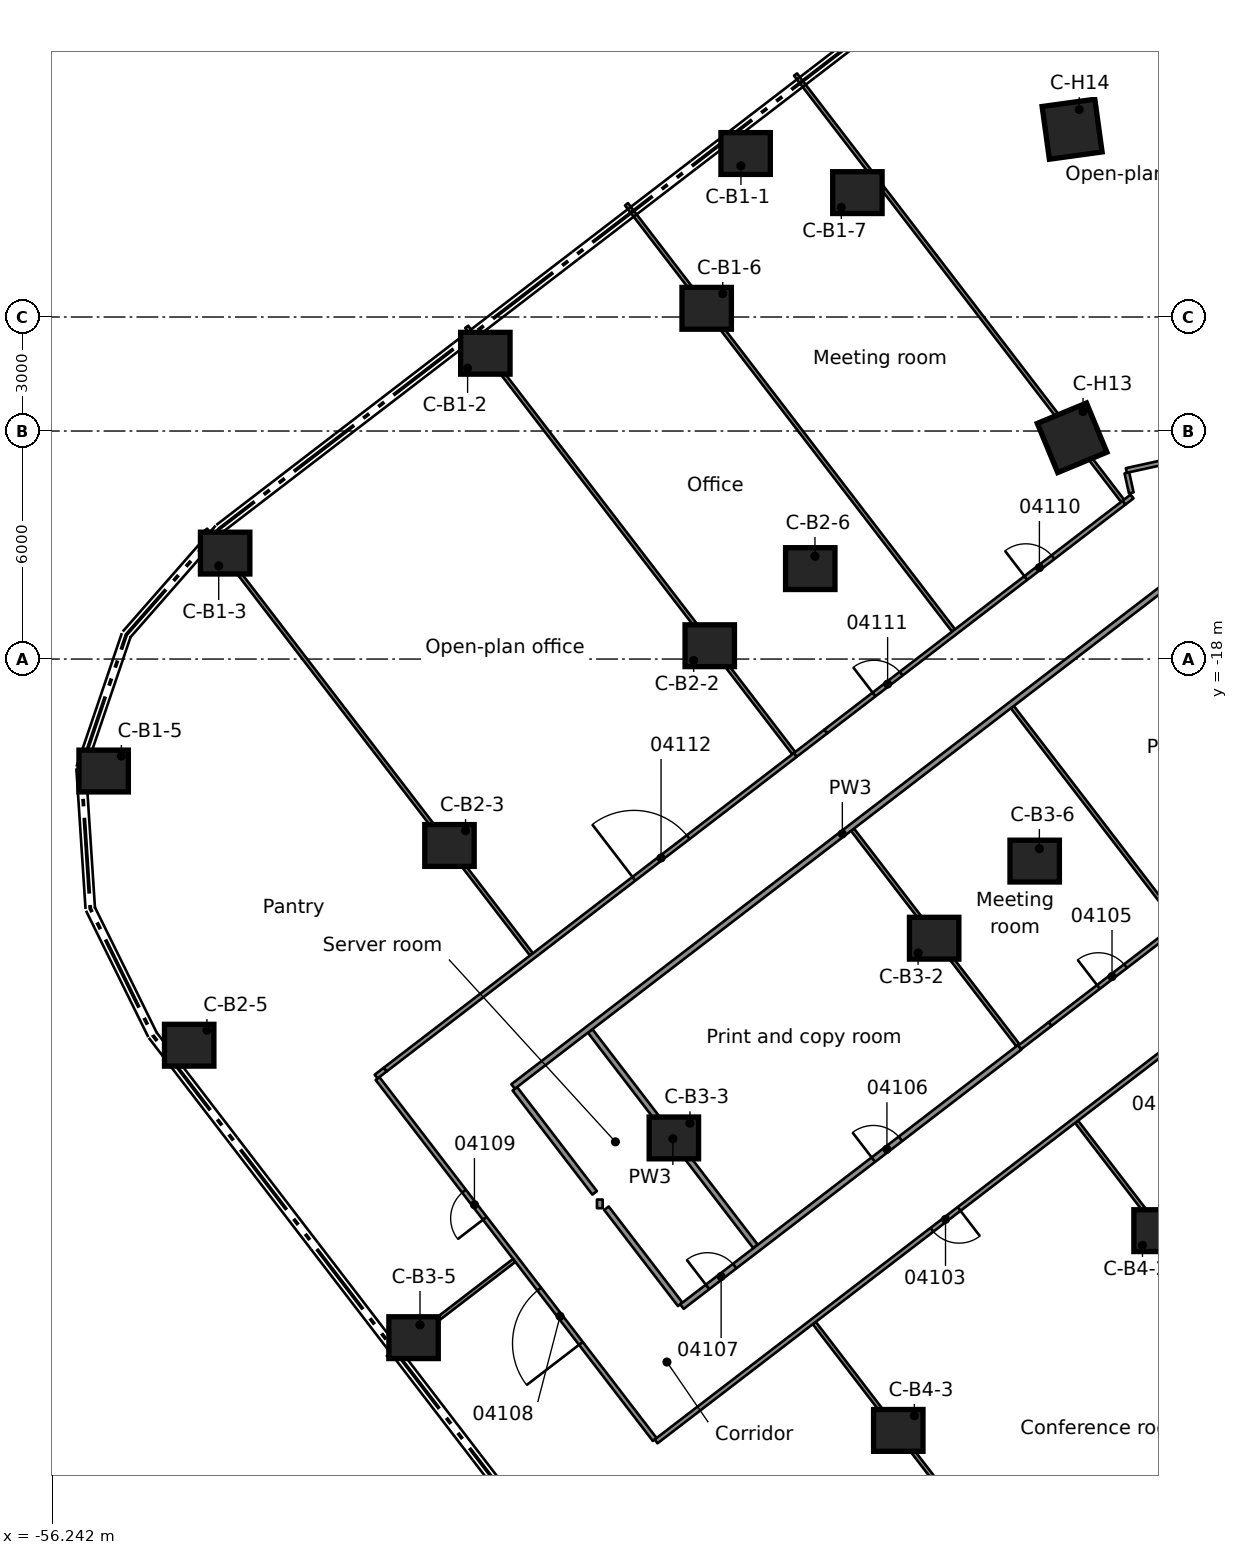
"""IFC4 building model, lengths in metres.
Left out: names, types, materials, properties, quantities, classifications, styles, units other than length and angle.
Written with IfcOpenShell. Run it as: python <this file> out.ifc"""

import sys

from ifc_helpers import new_model, si_unit, direction, frame, frame_2d, origin, origin_2d, place, context, subcontext, project, spatial, rectangle, extrude, element, fill, save


model = new_model("IFC4")
c1 = context("Model", 3, precision=1e-05, world=origin(), true_north=direction((0.0, 1.0)))
c2 = subcontext(c1, "Body", "Model", "MODEL_VIEW")
j1 = project(units=[si_unit("LENGTHUNIT", "METRE"), si_unit("PLANEANGLEUNIT", "RADIAN")], contexts=[c1])
p1 = place(None, origin())
s1 = spatial("IfcSite", under=j1, at=p1, CompositionType="ELEMENT")
p2 = place(p1, origin())
s2 = spatial("IfcBuilding", under=s1, at=p2, CompositionType="ELEMENT")
p3 = place(p2, frame((0.0, 0.0, 20.5)))
s3 = spatial("IfcBuildingStorey", under=s2, at=p3, CompositionType="ELEMENT", Elevation=20.5)
for number, where, z_axis, x_axis in (
    (1, (-37.991, -4.698, 0.0), (0.0, 0.0, 1.0), (1.0, 0.0, 0.0)),
    (2, (-44.84, -9.954, 0.0), (0.0, 0.0, 1.0), (1.0, 0.0, 0.0)),
    (3, (-51.687, -15.212, 0.0), (0.0, 0.0, 1.0), (1.0, 0.0, 0.0)),
    (4, (-54.884, -20.946, 0.0), (0.0, 0.0, 1.0), (1.0, 0.0, 0.0)),
    (5, (-39.016, -8.771, 0.0), (0.0, 0.0, 1.0), (1.0, 0.0, 0.0)),
    (6, (-35.05, -5.727, 0.0), (0.0, 0.0, 1.0), (1.0, 0.0, 0.0)),
    (7, (-38.935, -17.649, 0.0), (0.0, 0.0, 1.0), (1.0, 0.0, 0.0)),
    (8, (-45.784, -22.905, 0.0), (0.0, 0.0, 1.0), (1.0, 0.0, 0.0)),
    (9, (-52.633, -28.161, 0.0), (0.0, 0.0, 1.0), (1.0, 0.0, 0.0)),
    (10, (-36.29, -15.62, 0.0), (0.0, 0.0, 1.0), (1.0, 0.0, 0.0)),
    (11, (-33.03, -25.345, 0.0), (0.0, 0.0, 1.0), (1.0, 0.0, 0.0)),
    (12, (-39.879, -30.6, 0.0), (0.0, 0.0, 1.0), (1.0, 0.0, 0.0)),
    (13, (-46.729, -35.856, 0.0), (0.0, 0.0, 1.0), (1.0, 0.0, 0.0)),
    (14, (-30.385, -23.316, 0.0), (0.0, 0.0, 1.0), (1.0, 0.0, 0.0)),
    (15, (-27.125, -33.04, 0.0), (0.0, 0.0, 1.0), (1.0, 0.0, 0.0)),
    (16, (-33.974, -38.296, 0.0), (0.0, 0.0, 1.0), (1.0, 0.0, 0.0)),
):
    element("IfcColumn", number, at=place(p3, frame(where, z_axis=z_axis, x_axis=x_axis)), inside=s3, PredefinedType="COLUMN", context=c2, shape_type="SweptSolid", body=[
        extrude(rectangle(XDim=1.3, YDim=1.1, at=origin_2d()), origin(), (0.0, 0.0, 1.0), 4.6),
    ])
for number, where, z_axis, x_axis in (
    (17, (-29.4, -12.178, 0.0), (0.0, 0.0, 1.0), (-0.924, -0.383, 0.0)),
    (18, (-29.4, -4.059, 0.0), (0.0, 0.0, 1.0), (-0.991, -0.137, 0.0)),
):
    element("IfcColumn", number, at=place(p3, frame(where, z_axis=z_axis, x_axis=x_axis)), inside=s3, PredefinedType="COLUMN", context=c2, shape_type="SweptSolid", body=[
        extrude(rectangle(XDim=1.4, YDim=1.4, at=origin_2d()), origin(), (0.0, 0.0, 1.0), 4.6),
    ])
p4 = place(p3, frame((-27.959, -13.1, 0.0), z_axis=(0.0, 0.0, 1.0), x_axis=(0.215346078447, -0.976537795734, 0.0)))
e19 = element("IfcWall", 19, at=p4, inside=s3, PredefinedType="PARTITIONING", context=c2, shape_type="SweptSolid", body=[
    extrude(rectangle(XDim=0.539, YDim=0.125, at=frame_2d((0.269, 0.0))), origin(), (0.0, 0.0, 1.0), 4.16),
])
p5 = place(p3, frame((-40.384, -38.535, 0.0), z_axis=(0.0, 0.0, 1.0), x_axis=(-0.609026744184, 0.793149686294, 0.0)))
e20 = element("IfcWall", 20, at=p5, inside=s3, PredefinedType="PARTITIONING", context=c2, shape_type="SweptSolid", body=[
    extrude(rectangle(XDim=11.975, YDim=0.125, at=frame_2d((5.987, 0.0))), origin(), (0.0, 0.0, 1.0), 4.16),
])
p6 = place(p5, frame((3.188, 0.0, 0.0)))
e21 = element("IfcOpeningElement", 21, at=p6, cuts=e20, PredefinedType="OPENING", context=c2, shape_type="SweptSolid", body=[
    extrude(rectangle(XDim=1.8, YDim=2.1, at=frame_2d((0.9, 1.05))), frame((0.0, 0.073, 0.0), z_axis=(0.0, -1.0, 0.0), x_axis=(1.0, 0.0, 0.0)), (0.0, 0.0, 1.0), 0.145),
])
p7 = place(p5, frame((7.338, 0.0, 0.0)))
e22 = element("IfcOpeningElement", 22, at=p7, cuts=e20, PredefinedType="OPENING", context=c2, shape_type="SweptSolid", body=[
    extrude(rectangle(XDim=0.9, YDim=2.1, at=frame_2d((0.45, 1.05))), frame((0.0, 0.073, 0.0), z_axis=(0.0, -1.0, 0.0), x_axis=(1.0, 0.0, 0.0)), (0.0, 0.0, 1.0), 0.145),
])
p8 = place(p3, frame((-44.064, -29.307, 0.0), z_axis=(0.0, 0.0, 1.0), x_axis=(0.608421148176, -0.793614331053, 0.0)))
e23 = element("IfcWall", 23, at=p8, inside=s3, PredefinedType="PARTITIONING", context=c2, shape_type="SweptSolid", body=[
    extrude(rectangle(XDim=3.451, YDim=0.15, at=frame_2d((1.726, 0.0))), origin(), (0.0, 0.0, 1.0), 4.16),
])
p9 = place(p3, frame((-41.653, -32.45, 0.0), z_axis=(0.0, 0.0, 1.0), x_axis=(0.60867753108, -0.793417710389, 0.0)))
e24 = element("IfcWall", 24, at=p9, inside=s3, PredefinedType="PARTITIONING", context=c2, shape_type="SweptSolid", body=[
    extrude(rectangle(XDim=3.188, YDim=0.15, at=frame_2d((1.594, 0.0))), origin(), (0.0, 0.0, 1.0), 4.16),
])
p10 = place(p3, frame((-52.2, -14.599, 0.0), z_axis=(0.0, 0.0, 1.0), x_axis=(0.608818023879, -0.793309910312, 0.0)))
e25 = element("IfcWall", 25, at=p10, inside=s3, PredefinedType="PARTITIONING", context=c2, shape_type="SweptSolid", body=[
    extrude(rectangle(XDim=14.081, YDim=0.1, at=frame_2d((7.041, 0.0))), origin(), (0.0, 0.0, 1.0), 4.16),
])
p11 = place(p3, frame((-42.081, -27.786, 0.0), z_axis=(0.0, 0.0, 1.0), x_axis=(0.608779288924, -0.793339635577, 0.0)))
e26 = element("IfcWall", 26, at=p11, inside=s3, PredefinedType="PARTITIONING", context=c2, shape_type="SweptSolid", body=[
    extrude(rectangle(XDim=7.147, YDim=0.15, at=frame_2d((3.574, 0.0))), origin(), (0.0, 0.0, 1.0), 4.16),
])
p12 = place(p3, frame((-36.184, -35.471, 0.0), z_axis=(0.0, 0.0, 1.0), x_axis=(0.608732507749, -0.793375531517, 0.0)))
e27 = element("IfcWall", 27, at=p12, inside=s3, PredefinedType="PARTITIONING", context=c2, shape_type="SweptSolid", body=[
    extrude(rectangle(XDim=14.082, YDim=0.1, at=frame_2d((7.041, 0.0))), origin(), (0.0, 0.0, 1.0), 4.16),
])
p13 = place(p3, frame((-45.331, -9.259, 0.0), z_axis=(0.0, 0.0, 1.0), x_axis=(0.608775561638, -0.793342495743, 0.0)))
e28 = element("IfcWall", 28, at=p13, inside=s3, PredefinedType="PARTITIONING", context=c2, shape_type="SweptSolid", body=[
    extrude(rectangle(XDim=14.136, YDim=0.1, at=frame_2d((7.068, 0.0))), origin(), (0.0, 0.0, 1.0), 4.16),
])
p14 = place(p3, frame((-35.179, -22.489, 0.0), z_axis=(0.0, 0.0, 1.0), x_axis=(0.608729798771, -0.793377610024, 0.0)))
e29 = element("IfcWall", 29, at=p14, inside=s3, PredefinedType="PARTITIONING", context=c2, shape_type="SweptSolid", body=[
    extrude(rectangle(XDim=7.148, YDim=0.1, at=frame_2d((3.574, 0.0))), origin(), (0.0, 0.0, 1.0), 4.16),
])
p15 = place(p3, frame((-29.282, -30.175, 0.0), z_axis=(0.0, 0.0, 1.0), x_axis=(0.608783902678, -0.793336095132, 0.0)))
e30 = element("IfcWall", 30, at=p15, inside=s3, PredefinedType="PARTITIONING", context=c2, shape_type="SweptSolid", body=[
    extrude(rectangle(XDim=14.136, YDim=0.1, at=frame_2d((7.068, 0.0))), origin(), (0.0, 0.0, 1.0), 4.16),
])
p16 = place(p3, frame((-41.126, -6.033, 0.0), z_axis=(0.0, 0.0, 1.0), x_axis=(0.608775561638, -0.793342495743, 0.0)))
e31 = element("IfcWall", 31, at=p16, inside=s3, PredefinedType="PARTITIONING", context=c2, shape_type="SweptSolid", body=[
    extrude(rectangle(XDim=14.136, YDim=0.1, at=frame_2d((7.068, 0.0))), origin(), (0.0, 0.0, 1.0), 4.16),
])
p17 = place(p3, frame((-30.975, -19.261, 0.0), z_axis=(0.0, 0.0, 1.0), x_axis=(0.60876639971, -0.793349526113, 0.0)))
e32 = element("IfcWall", 32, at=p17, inside=s3, PredefinedType="PARTITIONING", context=c2, shape_type="SweptSolid", body=[
    extrude(rectangle(XDim=7.162, YDim=0.1, at=frame_2d((3.581, 0.0))), origin(), (0.0, 0.0, 1.0), 4.16),
])
p18 = place(p3, frame((-36.678, -2.62, 0.0), z_axis=(0.0, 0.0, 1.0), x_axis=(0.608783902678, -0.793336095132, 0.0)))
e33 = element("IfcWall", 33, at=p18, inside=s3, PredefinedType="PARTITIONING", context=c2, shape_type="SweptSolid", body=[
    extrude(rectangle(XDim=14.136, YDim=0.1, at=frame_2d((7.068, 0.0))), origin(), (0.0, 0.0, 1.0), 4.16),
])
p19 = place(p3, frame((-21.526, -11.624, 0.0), z_axis=(0.0, 0.0, 1.0), x_axis=(-0.976773623356, -0.214273863821, 0.0)))
e34 = element("IfcWall", 34, at=p19, inside=s3, PredefinedType="PARTITIONING", context=c2, shape_type="SweptSolid", body=[
    extrude(rectangle(XDim=6.599, YDim=0.125, at=frame_2d((3.3, 0.0))), origin(), (0.0, 0.0, 1.0), 4.16),
])
p20 = place(p3, frame((-20.592, -23.431, 0.0), z_axis=(0.0, 0.0, 1.0), x_axis=(-0.793434310261, -0.608655892356, 0.0)))
e35 = element("IfcWall", 35, at=p20, inside=s3, PredefinedType="PARTITIONING", context=c2, shape_type="SweptSolid", body=[
    extrude(rectangle(XDim=24.899, YDim=0.125, at=frame_2d((12.45, 0.0))), origin(), (0.0, 0.0, 1.0), 4.16),
])
p21 = place(p20, frame((2.443, 0.0, 0.0)))
e36 = element("IfcOpeningElement", 36, at=p21, cuts=e35, PredefinedType="OPENING", context=c2, shape_type="SweptSolid", body=[
    extrude(rectangle(XDim=0.9, YDim=2.1, at=frame_2d((0.45, 1.05))), frame((0.0, 0.073, 0.0), z_axis=(0.0, -1.0, 0.0), x_axis=(1.0, 0.0, 0.0)), (0.0, 0.0, 1.0), 0.145),
])
p22 = place(p20, frame((7.299, 0.0, 0.0)))
e37 = element("IfcOpeningElement", 37, at=p22, cuts=e35, PredefinedType="OPENING", context=c2, shape_type="SweptSolid", body=[
    extrude(rectangle(XDim=0.9, YDim=2.1, at=frame_2d((0.45, 1.05))), frame((0.0, 0.073, 0.0), z_axis=(0.0, -1.0, 0.0), x_axis=(1.0, 0.0, 0.0)), (0.0, 0.0, 1.0), 0.145),
])
p23 = place(p20, frame((14.849, 0.0, 0.0)))
e38 = element("IfcOpeningElement", 38, at=p23, cuts=e35, PredefinedType="OPENING", context=c2, shape_type="SweptSolid", body=[
    extrude(rectangle(XDim=0.9, YDim=2.1, at=frame_2d((0.45, 1.05))), frame((0.0, 0.073, 0.0), z_axis=(0.0, -1.0, 0.0), x_axis=(1.0, 0.0, 0.0)), (0.0, 0.0, 1.0), 0.145),
])
p24 = place(p3, frame((-30.782, -28.22, 0.0), z_axis=(0.0, 0.0, 1.0), x_axis=(0.793579274907, 0.608466872096, 0.0)))
e39 = element("IfcWall", 39, at=p24, inside=s3, PredefinedType="PARTITIONING", context=c2, shape_type="SweptSolid", body=[
    extrude(rectangle(XDim=1.016, YDim=0.125, at=frame_2d((0.508, 0.0))), origin(), (0.0, 0.0, 1.0), 4.16),
])
p25 = place(p3, frame((-39.667, -35.038, 0.0), z_axis=(0.0, 0.0, 1.0), x_axis=(0.793293656215, 0.608839202917, 0.0)))
e40 = element("IfcWall", 40, at=p25, inside=s3, PredefinedType="PARTITIONING", context=c2, shape_type="SweptSolid", body=[
    extrude(rectangle(XDim=11.2, YDim=0.15, at=frame_2d((5.6, 0.0))), origin(), (0.0, 0.0, 1.0), 4.16),
])
p26 = place(p25, frame((6.35, 0.0, 0.0)))
e41 = element("IfcOpeningElement", 41, at=p26, cuts=e40, PredefinedType="OPENING", context=c2, shape_type="SweptSolid", body=[
    extrude(rectangle(XDim=0.9, YDim=2.1, at=frame_2d((0.45, 1.05))), frame((0.0, 0.085, 0.0), z_axis=(0.0, -1.0, 0.0), x_axis=(1.0, 0.0, 0.0)), (0.0, 0.0, 1.0), 0.17),
])
p27 = place(p25, frame((0.85, 0.0, 0.0)))
e42 = element("IfcOpeningElement", 42, at=p27, cuts=e40, PredefinedType="OPENING", context=c2, shape_type="SweptSolid", body=[
    extrude(rectangle(XDim=0.9, YDim=2.1, at=frame_2d((0.45, 1.05))), frame((0.0, 0.085, 0.0), z_axis=(0.0, -1.0, 0.0), x_axis=(1.0, 0.0, 0.0)), (0.0, 0.0, 1.0), 0.17),
])
p28 = place(p3, frame((-29.976, -27.602, 0.0), z_axis=(0.0, 0.0, 1.0), x_axis=(0.793237948633, 0.608911780843, 0.0)))
e43 = element("IfcWall", 43, at=p28, inside=s3, PredefinedType="PARTITIONING", context=c2, shape_type="SweptSolid", body=[
    extrude(rectangle(XDim=9.336, YDim=0.125, at=frame_2d((4.668, 0.0))), origin(), (0.0, 0.0, 1.0), 4.16),
])
p29 = place(p28, frame((6.385, 0.0, 0.0)))
e44 = element("IfcOpeningElement", 44, at=p29, cuts=e43, PredefinedType="OPENING", context=c2, shape_type="SweptSolid", body=[
    extrude(rectangle(XDim=0.9, YDim=2.1, at=frame_2d((0.45, 1.05))), frame((0.0, 0.073, 0.0), z_axis=(0.0, -1.0, 0.0), x_axis=(1.0, 0.0, 0.0)), (0.0, 0.0, 1.0), 0.145),
])
p30 = place(p28, frame((1.6, 0.0, 0.0)))
e45 = element("IfcOpeningElement", 45, at=p30, cuts=e43, PredefinedType="OPENING", context=c2, shape_type="SweptSolid", body=[
    extrude(rectangle(XDim=0.9, YDim=2.1, at=frame_2d((0.45, 1.05))), frame((0.0, 0.073, 0.0), z_axis=(0.0, -1.0, 0.0), x_axis=(1.0, 0.0, 0.0)), (0.0, 0.0, 1.0), 0.145),
])
p31 = place(p3, frame((-47.403, -36.374, 0.0), z_axis=(0.0, 0.0, 1.0), x_axis=(0.793154740431, 0.609020162008, 0.0)))
e46 = element("IfcWall", 46, at=p31, inside=s3, PredefinedType="PARTITIONING", context=c2, shape_type="SweptSolid", body=[
    extrude(rectangle(XDim=4.187, YDim=0.1, at=frame_2d((2.094, 0.0))), origin(), (0.0, 0.0, 1.0), 4.16),
])
p32 = place(p3, frame((-44.11, -29.247, 0.0), z_axis=(0.0, 0.0, 1.0), x_axis=(0.793471030698, 0.608608021179, 0.0)))
e47 = element("IfcWall", 47, at=p32, inside=s3, PredefinedType="PARTITIONING", context=c2, shape_type="SweptSolid", body=[
    extrude(rectangle(XDim=21.838, YDim=0.15, at=frame_2d((10.919, 0.0))), origin(), (0.0, 0.0, 1.0), 4.16),
])
p33 = place(p3, frame((-36.687, -20.524, 0.0), z_axis=(0.0, 0.0, 1.0), x_axis=(0.793579274907, 0.608466872096, 0.0)))
e48 = element("IfcWall", 48, at=p33, inside=s3, PredefinedType="PARTITIONING", context=c2, shape_type="SweptSolid", body=[
    extrude(rectangle(XDim=1.016, YDim=0.125, at=frame_2d((0.508, 0.0))), origin(), (0.0, 0.0, 1.0), 4.16),
])
p34 = place(p3, frame((-47.476, -28.803, 0.0), z_axis=(0.0, 0.0, 1.0), x_axis=(0.793403481743, 0.608696077823, 0.0)))
e49 = element("IfcWall", 49, at=p34, inside=s3, PredefinedType="PARTITIONING", context=c2, shape_type="SweptSolid", body=[
    extrude(rectangle(XDim=13.6, YDim=0.125, at=frame_2d((6.8, 0.0))), origin(), (0.0, 0.0, 1.0), 4.16),
])
p35 = place(p34, frame((8.25, 0.0, 0.0)))
e50 = element("IfcOpeningElement", 50, at=p35, cuts=e49, PredefinedType="OPENING", context=c2, shape_type="SweptSolid", body=[
    extrude(rectangle(XDim=1.8, YDim=2.1, at=frame_2d((0.9, 1.05))), frame((0.0, 0.073, 0.0), z_axis=(0.0, -1.0, 0.0), x_axis=(1.0, 0.0, 0.0)), (0.0, 0.0, 1.0), 0.145),
])
p36 = place(p3, frame((-35.881, -19.906, 0.0), z_axis=(0.0, 0.0, 1.0), x_axis=(0.793370316216, 0.608739304914, 0.0)))
e51 = element("IfcWall", 51, at=p36, inside=s3, PredefinedType="PARTITIONING", context=c2, shape_type="SweptSolid", body=[
    extrude(rectangle(XDim=9.891, YDim=0.125, at=frame_2d((4.945, 0.0))), origin(), (0.0, 0.0, 1.0), 4.16),
])
p37 = place(p36, frame((6.634, 0.0, 0.0)))
e52 = element("IfcOpeningElement", 52, at=p37, cuts=e51, PredefinedType="OPENING", context=c2, shape_type="SweptSolid", body=[
    extrude(rectangle(XDim=0.9, YDim=2.1, at=frame_2d((0.45, 1.05))), frame((0.0, 0.073, 0.0), z_axis=(0.0, -1.0, 0.0), x_axis=(1.0, 0.0, 0.0)), (0.0, 0.0, 1.0), 0.145),
])
p38 = place(p36, frame((1.6, 0.0, 0.0)))
e53 = element("IfcOpeningElement", 53, at=p38, cuts=e51, PredefinedType="OPENING", context=c2, shape_type="SweptSolid", body=[
    extrude(rectangle(XDim=0.9, YDim=2.1, at=frame_2d((0.45, 1.05))), frame((0.0, 0.073, 0.0), z_axis=(0.0, -1.0, 0.0), x_axis=(1.0, 0.0, 0.0)), (0.0, 0.0, 1.0), 0.145),
])
p39 = place(p3, frame((-28.034, -13.885, 0.0), z_axis=(0.0, 0.0, 1.0), x_axis=(0.792488206653, 0.609887237378, 0.0)))
e54 = element("IfcWall", 54, at=p39, inside=s3, PredefinedType="PARTITIONING", context=c2, shape_type="SweptSolid", body=[
    extrude(rectangle(XDim=0.267, YDim=0.125, at=frame_2d((0.134, 0.0))), origin(), (0.0, 0.0, 1.0), 4.16),
])
p40 = place(p3, frame((-47.714, -28.986, 0.0), z_axis=(0.0, 0.0, 1.0), x_axis=(0.792623989105, 0.60971076085, 0.0)))
e55 = element("IfcWall", 55, at=p40, inside=s3, PredefinedType="PARTITIONING", context=c2, shape_type="SweptSolid", body=[
    extrude(rectangle(XDim=0.3, YDim=0.125, at=frame_2d((0.15, 0.0))), origin(), (0.0, 0.0, 1.0), 4.16),
])
p41 = place(p3, frame((-41.828, -32.449, 0.0), z_axis=(0.0, 0.0, 1.0), x_axis=(0.0, 1.0, 0.0)))
e56 = element("IfcWall", 56, at=p41, inside=s3, PredefinedType="PARTITIONING", context=c2, shape_type="SweptSolid", body=[
    extrude(rectangle(XDim=0.228, YDim=0.15, at=frame_2d((0.114, 0.0))), origin(), (0.0, 0.0, 1.0), 4.16),
])
p42 = place(p23, origin())
e57 = element("IfcDoor", 57, at=p42, inside=s3, OperationType="SINGLE_SWING_RIGHT", PredefinedType="DOOR", context=c2, shape_type="SweptSolid", body=[
    extrude(rectangle(XDim=0.9, YDim=2.1, at=frame_2d((0.45, 1.05))), frame((0.0, 0.025, 0.0), z_axis=(0.0, -1.0, 0.0), x_axis=(1.0, 0.0, 0.0)), (0.0, 0.0, 1.0), 0.05),
])
fill(e38, e57)
p43 = place(p30, origin())
e58 = element("IfcDoor", 58, at=p43, inside=s3, OperationType="SINGLE_SWING_LEFT", PredefinedType="DOOR", context=c2, shape_type="SweptSolid", body=[
    extrude(rectangle(XDim=0.9, YDim=2.1, at=frame_2d((0.45, 1.05))), frame((0.0, 0.025, 0.0), z_axis=(0.0, -1.0, 0.0), x_axis=(1.0, 0.0, 0.0)), (0.0, 0.0, 1.0), 0.05),
])
fill(e45, e58)
p44 = place(p26, origin())
e59 = element("IfcDoor", 59, at=p44, inside=s3, OperationType="SINGLE_SWING_RIGHT", PredefinedType="DOOR", context=c2, shape_type="SweptSolid", body=[
    extrude(rectangle(XDim=0.9, YDim=2.1, at=frame_2d((0.45, 1.05))), frame((0.0, 0.025, 0.0), z_axis=(0.0, -1.0, 0.0), x_axis=(1.0, 0.0, 0.0)), (0.0, 0.0, 1.0), 0.05),
])
fill(e41, e59)
p45 = place(p27, origin())
e60 = element("IfcDoor", 60, at=p45, inside=s3, OperationType="SINGLE_SWING_LEFT", PredefinedType="DOOR", context=c2, shape_type="SweptSolid", body=[
    extrude(rectangle(XDim=0.9, YDim=2.1, at=frame_2d((0.45, 1.05))), frame((0.0, 0.025, 0.0), z_axis=(0.0, -1.0, 0.0), x_axis=(1.0, 0.0, 0.0)), (0.0, 0.0, 1.0), 0.05),
])
fill(e42, e60)
p46 = place(p6, origin())
e61 = element("IfcDoor", 61, at=p46, inside=s3, OperationType="DOUBLE_DOOR_SINGLE_SWING", PredefinedType="DOOR", context=c2, shape_type="SweptSolid", body=[
    extrude(rectangle(XDim=1.8, YDim=2.1, at=frame_2d((0.9, 1.05))), frame((0.0, 0.025, 0.0), z_axis=(0.0, -1.0, 0.0), x_axis=(1.0, 0.0, 0.0)), (0.0, 0.0, 1.0), 0.05),
])
fill(e21, e61)
p47 = place(p7, origin())
e62 = element("IfcDoor", 62, at=p47, inside=s3, OperationType="SINGLE_SWING_RIGHT", PredefinedType="DOOR", context=c2, shape_type="SweptSolid", body=[
    extrude(rectangle(XDim=0.9, YDim=2.1, at=frame_2d((0.45, 1.05))), frame((0.0, 0.025, 0.0), z_axis=(0.0, -1.0, 0.0), x_axis=(1.0, 0.0, 0.0)), (0.0, 0.0, 1.0), 0.05),
])
fill(e22, e62)
p48 = place(p37, origin())
e63 = element("IfcDoor", 63, at=p48, inside=s3, OperationType="SINGLE_SWING_RIGHT", PredefinedType="DOOR", context=c2, shape_type="SweptSolid", body=[
    extrude(rectangle(XDim=0.9, YDim=2.1, at=frame_2d((0.45, 1.05))), frame((0.0, 0.025, 0.0), z_axis=(0.0, -1.0, 0.0), x_axis=(1.0, 0.0, 0.0)), (0.0, 0.0, 1.0), 0.05),
])
fill(e52, e63)
p49 = place(p38, origin())
e64 = element("IfcDoor", 64, at=p49, inside=s3, OperationType="SINGLE_SWING_LEFT", PredefinedType="DOOR", context=c2, shape_type="SweptSolid", body=[
    extrude(rectangle(XDim=0.9, YDim=2.1, at=frame_2d((0.45, 1.05))), frame((0.0, 0.025, 0.0), z_axis=(0.0, -1.0, 0.0), x_axis=(1.0, 0.0, 0.0)), (0.0, 0.0, 1.0), 0.05),
])
fill(e53, e64)
p50 = place(p35, origin())
e65 = element("IfcDoor", 65, at=p50, inside=s3, OperationType="DOUBLE_DOOR_SINGLE_SWING", PredefinedType="DOOR", context=c2, shape_type="SweptSolid", body=[
    extrude(rectangle(XDim=1.8, YDim=2.1, at=frame_2d((0.9, 1.05))), frame((0.0, 0.025, 0.0), z_axis=(0.0, -1.0, 0.0), x_axis=(1.0, 0.0, 0.0)), (0.0, 0.0, 1.0), 0.05),
])
fill(e50, e65)
save(model, sys.argv[1])
